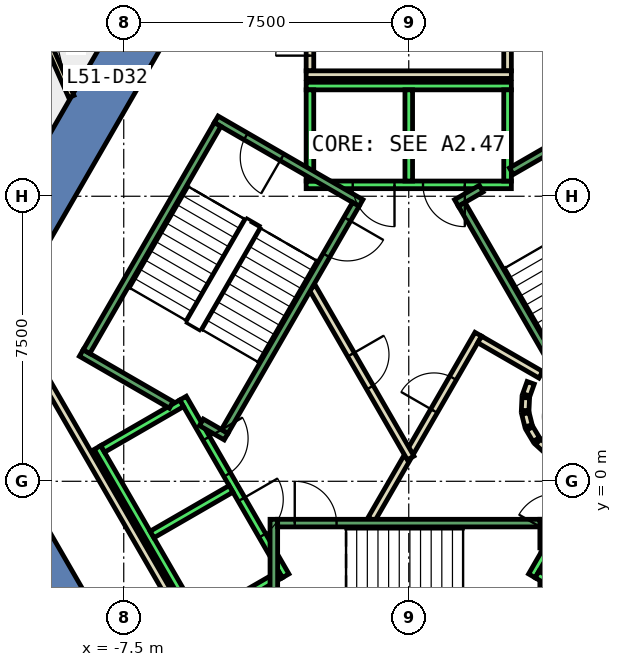
"""IFC4 building model, lengths in metres.
Left out: names, types, materials, properties, quantities, classifications, styles, units other than length and angle.
Written with IfcOpenShell. Run it as: python <this file> out.ifc"""

import sys

from ifc_helpers import new_model, si_unit, direction, frame, frame_2d, origin, place, context, subcontext, project, spatial, polyline, rectangle, outline, extrude, element, fill, save


model = new_model("IFC4")
c1 = context("Model", 3, precision=1e-05, world=origin(), true_north=direction((0.0, 1.0)))
c2 = subcontext(c1, "Body", "Model", "MODEL_VIEW")
j1 = project(units=[si_unit("LENGTHUNIT", "METRE"), si_unit("PLANEANGLEUNIT", "RADIAN")], contexts=[c1])
p1 = place(None, origin())
s1 = spatial("IfcSite", under=j1, at=p1, CompositionType="ELEMENT")
p2 = place(p1, origin())
s2 = spatial("IfcBuilding", under=s1, at=p2, CompositionType="ELEMENT")
p3 = place(p2, frame((0.0, 0.0, 227.6)))
s3 = spatial("IfcBuildingStorey", under=s2, at=p3, CompositionType="ELEMENT", Elevation=227.6)
p4 = place(p3, frame((0.0, 0.0, -0.4)))
e1 = element("IfcWall", 1, at=p4, inside=s3, PredefinedType="SHEAR", context=c2, shape_type="SweptSolid", body=[
    extrude(outline(polyline([(-11.834, 5.002), (-10.622, 4.302), (-5.831, 12.6), (-6.64, 14.0), (-11.834, 5.002)])), origin(), (0.0, 0.0, 1.0), 4.2),
])
p5 = place(p3, frame((0.0, 0.0, -0.4)))
e2 = element("IfcWall", 2, at=p5, inside=s3, PredefinedType="SHEAR", context=c2, shape_type="SweptSolid", body=[
    extrude(outline(polyline([(-13.279, 2.5), (-6.64, -9.0), (-5.831, -7.6), (-11.662, 2.5), (-13.279, 2.5)])), origin(), (0.0, 0.0, 1.0), 4.2),
])
p6 = place(p3, frame((-2.6, 10.8, 0.0), z_axis=(0.0, 0.0, 1.0), x_axis=(0.0, 1.0, 0.0)))
e3 = element("IfcWall", 3, at=p6, inside=s3, PredefinedType="PARTITIONING", context=c2, shape_type="SweptSolid", body=[
    extrude(rectangle(XDim=1.8, YDim=0.2, at=frame_2d((0.9, 0.0))), origin(), (0.0, 0.0, 1.0), 3.8),
])
p7 = place(p6, frame((0.4, 0.0, 0.0)))
e4 = element("IfcOpeningElement", 4, at=p7, cuts=e3, PredefinedType="OPENING", context=c2, shape_type="SweptSolid", body=[
    extrude(rectangle(XDim=0.9, YDim=2.1, at=frame_2d((0.45, 1.05))), frame((0.0, 0.11, 0.0), z_axis=(0.0, -1.0, 0.0), x_axis=(1.0, 0.0, 0.0)), (0.0, 0.0, 1.0), 0.22),
])
p8 = place(p3, frame((2.6, 12.6, 0.0), z_axis=(0.0, 0.0, 1.0), x_axis=(0.0, -1.0, 0.0)))
e5 = element("IfcWall", 5, at=p8, inside=s3, PredefinedType="PARTITIONING", context=c2, shape_type="SweptSolid", body=[
    extrude(rectangle(XDim=1.8, YDim=0.2, at=frame_2d((0.9, 0.0))), origin(), (0.0, 0.0, 1.0), 3.8),
])
p9 = place(p3, frame((2.7, 10.7, 0.0), z_axis=(0.0, 0.0, 1.0), x_axis=(-1.0, 0.0, 0.0)))
e6 = element("IfcWall", 6, at=p9, inside=s3, PredefinedType="PARTITIONING", context=c2, shape_type="SweptSolid", body=[
    extrude(rectangle(XDim=5.4, YDim=0.2, at=frame_2d((2.7, 0.0))), origin(), (0.0, 0.0, 1.0), 3.8),
])
p10 = place(p3, frame((-9.751, 2.99, 0.0), z_axis=(0.0, 0.0, 1.0), x_axis=(0.500012163284, -0.866018381195, 0.0)))
e7 = element("IfcWall", 7, at=p10, inside=s3, PredefinedType="PARTITIONING", context=c2, shape_type="SweptSolid", body=[
    extrude(rectangle(XDim=8.0, YDim=0.2, at=frame_2d((4.0, 0.0))), origin(), (0.0, 0.0, 1.0), 3.8),
])
p11 = place(p3, frame((-8.879, 10.123, 0.0), z_axis=(0.0, 0.0, 1.0), x_axis=(-0.404271206787, 0.914639159102, 0.0)))
e8 = element("IfcWall", 8, at=p11, inside=s3, PredefinedType="PARTITIONING", context=c2, shape_type="SweptSolid", body=[
    extrude(rectangle(XDim=3.495, YDim=0.15, at=frame_2d((1.748, 0.0))), origin(), (0.0, 0.0, 1.0), 3.8),
])
p12 = place(p3, frame((-0.982, -1.0, 0.0), z_axis=(0.0, 0.0, 1.0), x_axis=(0.50024047865, 0.865886518847, 0.0)))
e9 = element("IfcWall", 9, at=p12, inside=s3, PredefinedType="PARTITIONING", context=c2, shape_type="SweptSolid", body=[
    extrude(rectangle(XDim=1.863, YDim=0.2, at=frame_2d((0.931, 0.0))), origin(), (0.0, 0.0, 1.0), 3.8),
])
p13 = place(p3, frame((0.05, 0.787, 0.0), z_axis=(0.0, 0.0, 1.0), x_axis=(0.499954076797, 0.866051915934, 0.0)))
e10 = element("IfcWall", 10, at=p13, inside=s3, PredefinedType="PARTITIONING", context=c2, shape_type="SweptSolid", body=[
    extrude(rectangle(XDim=3.558, YDim=0.2, at=frame_2d((1.779, 0.0))), origin(), (0.0, 0.0, 1.0), 3.8),
])
p14 = place(p13, frame((1.229, 0.0, 0.0)))
e11 = element("IfcOpeningElement", 11, at=p14, cuts=e10, PredefinedType="OPENING", context=c2, shape_type="SweptSolid", body=[
    extrude(rectangle(XDim=1.0, YDim=2.1, at=frame_2d((0.5, 1.05))), frame((0.0, 0.11, 0.0), z_axis=(0.0, -1.0, 0.0), x_axis=(1.0, 0.0, 0.0)), (0.0, 0.0, 1.0), 0.22),
])
p15 = place(p3, frame((1.866, 3.732, 0.0), z_axis=(0.0, 0.0, 1.0), x_axis=(0.866043361281, -0.499968895414, 0.0)))
e12 = element("IfcWall", 12, at=p15, inside=s3, PredefinedType="PARTITIONING", context=c2, shape_type="SweptSolid", body=[
    extrude(rectangle(XDim=1.858, YDim=0.2, at=frame_2d((0.929, 0.0))), origin(), (0.0, 0.0, 1.0), 3.8),
])
p16 = place(p3, frame((3.208, 2.592, 0.0), z_axis=(0.0, 0.0, 1.0), x_axis=(-0.337388820924, -0.941365382578, 0.0)))
e13 = element("IfcWall", 13, at=p16, inside=s3, PredefinedType="PARTITIONING", context=c2, shape_type="SweptSolid", body=[
    extrude(rectangle(XDim=0.338, YDim=0.2, at=frame_2d((0.169, 0.0))), origin(), (0.0, 0.0, 1.0), 3.8),
])
p17 = place(p3, frame((3.079, 2.199, 0.0), z_axis=(0.0, 0.0, 1.0), x_axis=(-0.047771483479, -0.998858290933, 0.0)))
e14 = element("IfcWall", 14, at=p17, inside=s3, PredefinedType="PARTITIONING", context=c2, shape_type="SweptSolid", body=[
    extrude(rectangle(XDim=0.337, YDim=0.2, at=frame_2d((0.169, 0.0))), origin(), (0.0, 0.0, 1.0), 3.8),
])
p18 = place(p3, frame((3.07, 1.786, 0.0), z_axis=(0.0, 0.0, 1.0), x_axis=(0.242705583207, -0.970099994784, 0.0)))
e15 = element("IfcWall", 15, at=p18, inside=s3, PredefinedType="PARTITIONING", context=c2, shape_type="SweptSolid", body=[
    extrude(rectangle(XDim=0.338, YDim=0.2, at=frame_2d((0.169, 0.0))), origin(), (0.0, 0.0, 1.0), 3.8),
])
for number, where, z_axis, x_axis in (
    (16, (3.182, 1.388, 0.0), (0.0, 0.0, 1.0), (0.512, -0.859, 0.0)),
    (17, (3.404, 1.039, 0.0), (0.0, 0.0, 1.0), (0.74, -0.672, 0.0)),
):
    element("IfcWall", number, at=place(p3, frame(where, z_axis=z_axis, x_axis=x_axis)), inside=s3, PredefinedType="PARTITIONING", context=c2, shape_type="SweptSolid", body=[
        extrude(rectangle(XDim=0.338, YDim=0.2, at=frame_2d((0.169, 0.0))), origin(), (0.0, 0.0, 1.0), 3.8),
    ])
p19 = place(p3, frame((-2.54, 5.1, 0.0), z_axis=(0.0, 0.0, 1.0), x_axis=(0.499925051871, -0.866068670783, 0.0)))
e18 = element("IfcWall", 18, at=p19, inside=s3, PredefinedType="PARTITIONING", context=c2, shape_type="SweptSolid", body=[
    extrude(rectangle(XDim=5.181, YDim=0.2, at=frame_2d((2.59, 0.0))), origin(), (0.0, 0.0, 1.0), 3.8),
])
p20 = place(p19, frame((2.04, 0.0, 0.0)))
e19 = element("IfcOpeningElement", 19, at=p20, cuts=e18, PredefinedType="OPENING", context=c2, shape_type="SweptSolid", body=[
    extrude(rectangle(XDim=1.0, YDim=2.1, at=frame_2d((0.5, 1.05))), frame((0.0, 0.11, 0.0), z_axis=(0.0, -1.0, 0.0), x_axis=(1.0, 0.0, 0.0)), (0.0, 0.0, 1.0), 0.22),
])
p21 = place(p3, frame((2.7, 7.8, 0.0), z_axis=(0.0, 0.0, 1.0), x_axis=(-1.0, 0.0, 0.0)))
e20 = element("IfcWall", 20, at=p21, inside=s3, PredefinedType="STANDARD", context=c2, shape_type="SweptSolid", body=[
    extrude(rectangle(XDim=5.4, YDim=0.2, at=frame_2d((2.7, 0.0))), origin(), (0.0, 0.0, 1.0), 3.8),
])
p22 = place(p21, frame((1.225, 0.0, 0.0)))
e21 = element("IfcOpeningElement", 21, at=p22, cuts=e20, PredefinedType="OPENING", context=c2, shape_type="SweptSolid", body=[
    extrude(rectangle(XDim=1.1, YDim=2.1, at=frame_2d((0.55, 1.05))), frame((0.0, 0.11, 0.0), z_axis=(0.0, -1.0, 0.0), x_axis=(1.0, 0.0, 0.0)), (0.0, 0.0, 1.0), 0.22),
])
p23 = place(p21, frame((3.075, 0.0, 0.0)))
e22 = element("IfcOpeningElement", 22, at=p23, cuts=e20, PredefinedType="OPENING", context=c2, shape_type="SweptSolid", body=[
    extrude(rectangle(XDim=1.1, YDim=2.1, at=frame_2d((0.55, 1.05))), frame((0.0, 0.11, 0.0), z_axis=(0.0, -1.0, 0.0), x_axis=(1.0, 0.0, 0.0)), (0.0, 0.0, 1.0), 0.22),
])
p24 = place(p3, frame((2.7, 10.4, 0.0), z_axis=(0.0, 0.0, 1.0), x_axis=(-1.0, 0.0, 0.0)))
e23 = element("IfcWall", 23, at=p24, inside=s3, PredefinedType="STANDARD", context=c2, shape_type="SweptSolid", body=[
    extrude(rectangle(XDim=5.4, YDim=0.2, at=frame_2d((2.7, 0.0))), origin(), (0.0, 0.0, 1.0), 3.8),
])
for number, where, z_axis, x_axis in (
    (24, (2.6, 7.9, 0.0), (0.0, 0.0, 1.0), (0.0, 1.0, 0.0)),
    (25, (0.0, 7.9, 0.0), (0.0, 0.0, 1.0), (0.0, 1.0, 0.0)),
    (26, (-2.6, 7.9, 0.0), (0.0, 0.0, 1.0), (0.0, 1.0, 0.0)),
):
    element("IfcWall", number, at=place(p3, frame(where, z_axis=z_axis, x_axis=x_axis)), inside=s3, PredefinedType="STANDARD", context=c2, shape_type="SweptSolid", body=[
        extrude(rectangle(XDim=2.4, YDim=0.2, at=frame_2d((1.2, 0.0))), origin(), (0.0, 0.0, 1.0), 3.8),
    ])
p25 = place(p3, frame((-5.94, 2.188, 0.0), z_axis=(0.0, 0.0, 1.0), x_axis=(0.500034260056, -0.866005622828, 0.0)))
e27 = element("IfcWall", 27, at=p25, inside=s3, PredefinedType="STANDARD", context=c2, shape_type="SweptSolid", body=[
    extrude(rectangle(XDim=5.399, YDim=0.2, at=frame_2d((2.7, 0.0))), origin(), (0.0, 0.0, 1.0), 3.8),
])
p26 = place(p25, frame((3.075, 0.0, 0.0)))
e28 = element("IfcOpeningElement", 28, at=p26, cuts=e27, PredefinedType="OPENING", context=c2, shape_type="SweptSolid", body=[
    extrude(rectangle(XDim=1.1, YDim=2.1, at=frame_2d((0.55, 1.05))), frame((0.0, 0.11, 0.0), z_axis=(0.0, -1.0, 0.0), x_axis=(1.0, 0.0, 0.0)), (0.0, 0.0, 1.0), 0.22),
])
p27 = place(p25, frame((1.225, 0.0, 0.0)))
e29 = element("IfcOpeningElement", 29, at=p27, cuts=e27, PredefinedType="OPENING", context=c2, shape_type="SweptSolid", body=[
    extrude(rectangle(XDim=1.1, YDim=2.1, at=frame_2d((0.55, 1.05))), frame((0.0, 0.11, 0.0), z_axis=(0.0, -1.0, 0.0), x_axis=(1.0, 0.0, 0.0)), (0.0, 0.0, 1.0), 0.22),
])
p28 = place(p3, frame((-8.192, 0.888, 0.0), z_axis=(0.0, 0.0, 1.0), x_axis=(0.500034260056, -0.866005622828, 0.0)))
e30 = element("IfcWall", 30, at=p28, inside=s3, PredefinedType="STANDARD", context=c2, shape_type="SweptSolid", body=[
    extrude(rectangle(XDim=5.399, YDim=0.2, at=frame_2d((2.7, 0.0))), origin(), (0.0, 0.0, 1.0), 3.8),
])
for number, where, z_axis, x_axis in (
    (31, (-5.977, 2.052, 0.0), (0.0, 0.0, 1.0), (-0.866, -0.5, 0.0)),
    (32, (-4.677, -0.2, 0.0), (0.0, 0.0, 1.0), (-0.866, -0.5, 0.0)),
):
    element("IfcWall", number, at=place(p3, frame(where, z_axis=z_axis, x_axis=x_axis)), inside=s3, PredefinedType="STANDARD", context=c2, shape_type="SweptSolid", body=[
        extrude(rectangle(XDim=2.399, YDim=0.2, at=frame_2d((1.2, 0.0))), origin(), (0.0, 0.0, 1.0), 3.8),
    ])
p29 = place(p3, frame((-3.377, -2.452, 0.0), z_axis=(0.0, 0.0, 1.0), x_axis=(-0.865955154139, -0.50012165622, 0.0)))
e33 = element("IfcWall", 33, at=p29, inside=s3, PredefinedType="STANDARD", context=c2, shape_type="SweptSolid", body=[
    extrude(rectangle(XDim=2.4, YDim=0.2, at=frame_2d((1.2, 0.0))), origin(), (0.0, 0.0, 1.0), 3.8),
])
p30 = place(p3, frame((3.24, -2.488, 0.0), z_axis=(0.0, 0.0, 1.0), x_axis=(0.500034260056, 0.866005622828, 0.0)))
e34 = element("IfcWall", 34, at=p30, inside=s3, PredefinedType="STANDARD", context=c2, shape_type="SweptSolid", body=[
    extrude(rectangle(XDim=5.399, YDim=0.2, at=frame_2d((2.7, 0.0))), origin(), (0.0, 0.0, 1.0), 3.8),
])
p31 = place(p30, frame((3.225, 0.0, 0.0)))
e35 = element("IfcOpeningElement", 35, at=p31, cuts=e34, PredefinedType="OPENING", context=c2, shape_type="SweptSolid", body=[
    extrude(rectangle(XDim=1.1, YDim=2.1, at=frame_2d((0.55, 1.05))), frame((0.0, 0.11, 0.0), z_axis=(0.0, -1.0, 0.0), x_axis=(1.0, 0.0, 0.0)), (0.0, 0.0, 1.0), 0.22),
])
p32 = place(p30, frame((1.225, 0.0, 0.0)))
e36 = element("IfcOpeningElement", 36, at=p32, cuts=e34, PredefinedType="OPENING", context=c2, shape_type="SweptSolid", body=[
    extrude(rectangle(XDim=1.1, YDim=2.1, at=frame_2d((0.55, 1.05))), frame((0.0, 0.11, 0.0), z_axis=(0.0, -1.0, 0.0), x_axis=(1.0, 0.0, 0.0)), (0.0, 0.0, 1.0), 0.22),
])
p33 = place(p3, frame((3.377, -2.452, 0.0), z_axis=(0.0, 0.0, 1.0), x_axis=(0.865955154139, -0.50012165622, 0.0)))
e37 = element("IfcWall", 37, at=p33, inside=s3, PredefinedType="STANDARD", context=c2, shape_type="SweptSolid", body=[
    extrude(rectangle(XDim=2.4, YDim=0.2, at=frame_2d((1.2, 0.0))), origin(), (0.0, 0.0, 1.0), 3.8),
])
p34 = place(p3, frame((-3.55, -1.0, 0.0), z_axis=(0.0, 0.0, 1.0), x_axis=(0.0, -1.0, 0.0)))
e38 = element("IfcWall", 38, at=p34, inside=s3, PredefinedType="STANDARD", context=c2, shape_type="SweptSolid", body=[
    extrude(rectangle(XDim=4.4, YDim=0.2, at=frame_2d((2.2, 0.0))), origin(), (0.0, 0.0, 1.0), 3.8),
])
p35 = place(p34, frame((2.4, 0.0, 0.0)))
e39 = element("IfcOpeningElement", 39, at=p35, cuts=e38, PredefinedType="OPENING", context=c2, shape_type="SweptSolid", body=[
    extrude(rectangle(XDim=1.1, YDim=2.2, at=frame_2d((0.55, 1.1))), frame((0.0, 0.11, 0.0), z_axis=(0.0, -1.0, 0.0), x_axis=(1.0, 0.0, 0.0)), (0.0, 0.0, 1.0), 0.22),
])
p36 = place(p3, frame((3.55, -2.667, 0.0), z_axis=(0.0, 0.0, 1.0), x_axis=(0.0, -1.0, 0.0)))
e40 = element("IfcWall", 40, at=p36, inside=s3, PredefinedType="STANDARD", context=c2, shape_type="SweptSolid", body=[
    extrude(rectangle(XDim=2.733, YDim=0.2, at=frame_2d((1.366, 0.0))), origin(), (0.0, 0.0, 1.0), 3.8),
])
p37 = place(p3, frame((3.55, -1.0, 0.0), z_axis=(0.0, 0.0, 1.0), x_axis=(0.0, -1.0, 0.0)))
e41 = element("IfcWall", 41, at=p37, inside=s3, PredefinedType="STANDARD", context=c2, shape_type="SweptSolid", body=[
    extrude(rectangle(XDim=0.751, YDim=0.2, at=frame_2d((0.375, 0.0))), origin(), (0.0, 0.0, 1.0), 3.8),
])
p38 = place(p3, frame((-3.45, -1.1, 0.0), z_axis=(0.0, 0.0, 1.0), x_axis=(1.0, 0.0, 0.0)))
e42 = element("IfcWall", 42, at=p38, inside=s3, PredefinedType="STANDARD", context=c2, shape_type="SweptSolid", body=[
    extrude(rectangle(XDim=6.9, YDim=0.2, at=frame_2d((3.45, 0.0))), origin(), (0.0, 0.0, 1.0), 3.8),
])
p39 = place(p38, frame((0.45, 0.0, 0.0)))
e43 = element("IfcOpeningElement", 43, at=p39, cuts=e42, PredefinedType="OPENING", context=c2, shape_type="SweptSolid", body=[
    extrude(rectangle(XDim=1.1, YDim=2.2, at=frame_2d((0.55, 1.1))), frame((0.0, 0.11, 0.0), z_axis=(0.0, -1.0, 0.0), x_axis=(1.0, 0.0, 0.0)), (0.0, 0.0, 1.0), 0.22),
])
p40 = place(p3, frame((2.7, 8.158, 0.0), z_axis=(0.0, 0.0, 1.0), x_axis=(0.86611865017, 0.499838457731, 0.0)))
e44 = element("IfcWall", 44, at=p40, inside=s3, PredefinedType="STANDARD", context=c2, shape_type="SweptSolid", body=[
    extrude(rectangle(XDim=2.733, YDim=0.2, at=frame_2d((1.366, 0.0))), origin(), (0.0, 0.0, 1.0), 3.8),
])
p41 = place(p3, frame((1.256, 7.324, 0.0), z_axis=(0.0, 0.0, 1.0), x_axis=(0.865915093549, 0.500191014278, 0.0)))
e45 = element("IfcWall", 45, at=p41, inside=s3, PredefinedType="STANDARD", context=c2, shape_type="SweptSolid", body=[
    extrude(rectangle(XDim=0.752, YDim=0.2, at=frame_2d((0.376, 0.0))), origin(), (0.0, 0.0, 1.0), 3.8),
])
p42 = place(p3, frame((4.843, 1.312, 0.0), z_axis=(0.0, 0.0, 1.0), x_axis=(-0.499963383562, 0.866046543262, 0.0)))
e46 = element("IfcWall", 46, at=p42, inside=s3, PredefinedType="STANDARD", context=c2, shape_type="SweptSolid", body=[
    extrude(rectangle(XDim=6.9, YDim=0.2, at=frame_2d((3.45, 0.0))), origin(), (0.0, 0.0, 1.0), 3.8),
])
p43 = place(p42, frame((0.45, 0.0, 0.0)))
e47 = element("IfcOpeningElement", 47, at=p43, cuts=e46, PredefinedType="OPENING", context=c2, shape_type="SweptSolid", body=[
    extrude(rectangle(XDim=1.1, YDim=2.2, at=frame_2d((0.55, 1.1))), frame((0.0, 0.11, 0.0), z_axis=(0.0, -1.0, 0.0), x_axis=(1.0, 0.0, 0.0)), (0.0, 0.0, 1.0), 0.22),
])
p44 = place(p3, frame((-1.256, 7.324, 0.0), z_axis=(0.0, 0.0, 1.0), x_axis=(-0.866046073146, 0.499964197906, 0.0)))
e48 = element("IfcWall", 48, at=p44, inside=s3, PredefinedType="STANDARD", context=c2, shape_type="SweptSolid", body=[
    extrude(rectangle(XDim=4.4, YDim=0.2, at=frame_2d((2.2, 0.0))), origin(), (0.0, 0.0, 1.0), 3.8),
])
p45 = place(p44, frame((2.4, 0.0, 0.0)))
e49 = element("IfcOpeningElement", 49, at=p45, cuts=e48, PredefinedType="OPENING", context=c2, shape_type="SweptSolid", body=[
    extrude(rectangle(XDim=1.1, YDim=2.2, at=frame_2d((0.55, 1.1))), frame((0.0, 0.11, 0.0), z_axis=(0.0, -1.0, 0.0), x_axis=(1.0, 0.0, 0.0)), (0.0, 0.0, 1.0), 0.22),
])
p46 = place(p3, frame((-6.25, 2.01, 0.0), z_axis=(0.0, 0.0, 1.0), x_axis=(-0.86611865017, 0.499838457731, 0.0)))
e50 = element("IfcWall", 50, at=p46, inside=s3, PredefinedType="STANDARD", context=c2, shape_type="SweptSolid", body=[
    extrude(rectangle(XDim=2.733, YDim=0.2, at=frame_2d((1.366, 0.0))), origin(), (0.0, 0.0, 1.0), 3.8),
])
p47 = place(p3, frame((-4.806, 1.176, 0.0), z_axis=(0.0, 0.0, 1.0), x_axis=(-0.866558586415, 0.499075361355, 0.0)))
e51 = element("IfcWall", 51, at=p47, inside=s3, PredefinedType="STANDARD", context=c2, shape_type="SweptSolid", body=[
    extrude(rectangle(XDim=0.751, YDim=0.2, at=frame_2d((0.376, 0.0))), origin(), (0.0, 0.0, 1.0), 3.8),
])
p48 = place(p3, frame((-1.393, 7.288, 0.0), z_axis=(0.0, 0.0, 1.0), x_axis=(-0.499963383562, -0.866046543262, 0.0)))
e52 = element("IfcWall", 52, at=p48, inside=s3, PredefinedType="STANDARD", context=c2, shape_type="SweptSolid", body=[
    extrude(rectangle(XDim=6.9, YDim=0.2, at=frame_2d((3.45, 0.0))), origin(), (0.0, 0.0, 1.0), 3.8),
])
p49 = place(p48, frame((0.45, 0.0, 0.0)))
e53 = element("IfcOpeningElement", 53, at=p49, cuts=e52, PredefinedType="OPENING", context=c2, shape_type="SweptSolid", body=[
    extrude(rectangle(XDim=1.1, YDim=2.2, at=frame_2d((0.55, 1.1))), frame((0.0, 0.11, 0.0), z_axis=(0.0, -1.0, 0.0), x_axis=(1.0, 0.0, 0.0)), (0.0, 0.0, 1.0), 0.22),
])
p50 = place(p3, frame((-5.03, 9.388, 0.0), z_axis=(0.0, 0.0, 1.0), x_axis=(-0.499978703459, -0.866037698999, 0.0)))
e54 = element("IfcWall", 54, at=p50, inside=s3, PredefinedType="STANDARD", context=c2, shape_type="SweptSolid", body=[
    extrude(rectangle(XDim=6.9, YDim=0.2, at=frame_2d((3.45, 0.0))), origin(), (0.0, 0.0, 1.0), 3.8),
])
p51 = place(p14, origin())
e55 = element("IfcDoor", 55, at=p51, inside=s3, OperationType="SINGLE_SWING_RIGHT", PredefinedType="DOOR", context=c2, shape_type="SweptSolid", body=[
    extrude(rectangle(XDim=1.0, YDim=2.1, at=frame_2d((0.5, 1.05))), frame((0.0, 0.025, 0.0), z_axis=(0.0, -1.0, 0.0), x_axis=(1.0, 0.0, 0.0)), (0.0, 0.0, 1.0), 0.05),
])
fill(e11, e55)
p52 = place(p20, origin())
e56 = element("IfcDoor", 56, at=p52, inside=s3, OperationType="SINGLE_SWING_RIGHT", PredefinedType="DOOR", context=c2, shape_type="SweptSolid", body=[
    extrude(rectangle(XDim=1.0, YDim=2.1, at=frame_2d((0.5, 1.05))), frame((0.0, 0.025, 0.0), z_axis=(0.0, -1.0, 0.0), x_axis=(1.0, 0.0, 0.0)), (0.0, 0.0, 1.0), 0.05),
])
fill(e19, e56)
p53 = place(p7, origin())
e57 = element("IfcDoor", 57, at=p53, inside=s3, OperationType="SINGLE_SWING_RIGHT", PredefinedType="DOOR", context=c2, shape_type="SweptSolid", body=[
    extrude(rectangle(XDim=0.9, YDim=2.1, at=frame_2d((0.45, 1.05))), frame((0.0, 0.025, 0.0), z_axis=(0.0, -1.0, 0.0), x_axis=(1.0, 0.0, 0.0)), (0.0, 0.0, 1.0), 0.05),
])
fill(e4, e57)
p54 = place(p22, origin())
e58 = element("IfcDoor", 58, at=p54, inside=s3, OperationType="SLIDING_TO_LEFT", PredefinedType="DOOR", context=c2, shape_type="SweptSolid", body=[
    extrude(rectangle(XDim=1.1, YDim=2.1, at=frame_2d((0.55, 1.05))), frame((0.0, 0.025, 0.0), z_axis=(0.0, -1.0, 0.0), x_axis=(1.0, 0.0, 0.0)), (0.0, 0.0, 1.0), 0.05),
])
fill(e21, e58)
p55 = place(p23, origin())
e59 = element("IfcDoor", 59, at=p55, inside=s3, OperationType="SLIDING_TO_LEFT", PredefinedType="DOOR", context=c2, shape_type="SweptSolid", body=[
    extrude(rectangle(XDim=1.1, YDim=2.1, at=frame_2d((0.55, 1.05))), frame((0.0, 0.025, 0.0), z_axis=(0.0, -1.0, 0.0), x_axis=(1.0, 0.0, 0.0)), (0.0, 0.0, 1.0), 0.05),
])
fill(e22, e59)
p56 = place(p26, origin())
e60 = element("IfcDoor", 60, at=p56, inside=s3, OperationType="SLIDING_TO_LEFT", PredefinedType="DOOR", context=c2, shape_type="SweptSolid", body=[
    extrude(rectangle(XDim=1.1, YDim=2.1, at=frame_2d((0.55, 1.05))), frame((0.0, 0.025, 0.0), z_axis=(0.0, -1.0, 0.0), x_axis=(1.0, 0.0, 0.0)), (0.0, 0.0, 1.0), 0.05),
])
fill(e28, e60)
p57 = place(p27, origin())
e61 = element("IfcDoor", 61, at=p57, inside=s3, OperationType="SLIDING_TO_LEFT", PredefinedType="DOOR", context=c2, shape_type="SweptSolid", body=[
    extrude(rectangle(XDim=1.1, YDim=2.1, at=frame_2d((0.55, 1.05))), frame((0.0, 0.025, 0.0), z_axis=(0.0, -1.0, 0.0), x_axis=(1.0, 0.0, 0.0)), (0.0, 0.0, 1.0), 0.05),
])
fill(e29, e61)
p58 = place(p39, origin())
e62 = element("IfcDoor", 62, at=p58, inside=s3, OperationType="SINGLE_SWING_LEFT", PredefinedType="DOOR", context=c2, shape_type="SweptSolid", body=[
    extrude(rectangle(XDim=1.1, YDim=2.2, at=frame_2d((0.55, 1.1))), frame((0.0, 0.025, 0.0), z_axis=(0.0, -1.0, 0.0), x_axis=(1.0, 0.0, 0.0)), (0.0, 0.0, 1.0), 0.05),
])
fill(e43, e62)
p59 = place(p49, origin())
e63 = element("IfcDoor", 63, at=p59, inside=s3, OperationType="SINGLE_SWING_LEFT", PredefinedType="DOOR", context=c2, shape_type="SweptSolid", body=[
    extrude(rectangle(XDim=1.1, YDim=2.2, at=frame_2d((0.55, 1.1))), frame((0.0, 0.025, 0.0), z_axis=(0.0, -1.0, 0.0), x_axis=(1.0, 0.0, 0.0)), (0.0, 0.0, 1.0), 0.05),
])
fill(e53, e63)
p60 = place(p45, origin())
e64 = element("IfcDoor", 64, at=p60, inside=s3, OperationType="SINGLE_SWING_LEFT", PredefinedType="DOOR", context=c2, shape_type="SweptSolid", body=[
    extrude(rectangle(XDim=1.1, YDim=2.2, at=frame_2d((0.55, 1.1))), frame((0.0, 0.025, 0.0), z_axis=(0.0, -1.0, 0.0), x_axis=(1.0, 0.0, 0.0)), (0.0, 0.0, 1.0), 0.05),
])
fill(e49, e64)
save(model, sys.argv[1])
